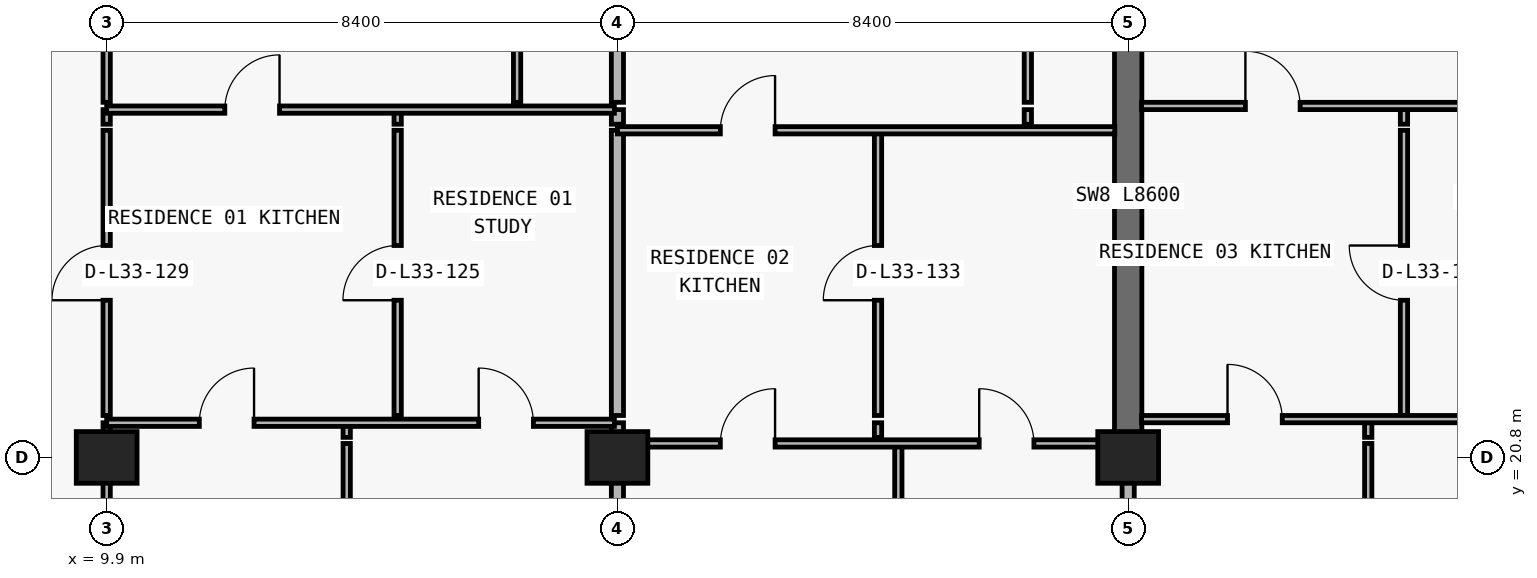
"""IFC4 building model, lengths in metres.
Left out: names, types, materials, properties, quantities, classifications, styles, units other than length and angle.
Written with IfcOpenShell. Run it as: python <this file> out.ifc"""

import sys

from ifc_helpers import new_model, si_unit, direction, frame, frame_2d, origin, origin_2d, place, context, subcontext, project, spatial, rectangle, extrude, element, fill, save


model = new_model("IFC4")
c1 = context("Model", 3, precision=1e-05, world=origin(), true_north=direction((0.0, 1.0)))
c2 = subcontext(c1, "Body", "Model", "MODEL_VIEW")
j1 = project(units=[si_unit("LENGTHUNIT", "METRE"), si_unit("PLANEANGLEUNIT", "RADIAN")], contexts=[c1])
p1 = place(None, origin())
s1 = spatial("IfcSite", under=j1, at=p1, CompositionType="ELEMENT")
p2 = place(p1, origin())
s2 = spatial("IfcBuilding", under=s1, at=p2, CompositionType="ELEMENT")
p3 = place(p2, frame((0.0, 0.0, 122.4)))
s3 = spatial("IfcBuildingStorey", under=s2, at=p3, CompositionType="ELEMENT", Elevation=122.4)
for number, where, z_axis, x_axis in (
    (1, (9.9, 20.8, 0.0), (0.0, 0.0, 1.0), (1.0, 0.0, 0.0)),
    (2, (18.3, 20.8, 0.0), (0.0, 0.0, 1.0), (1.0, 0.0, 0.0)),
    (3, (26.7, 20.8, 0.0), (0.0, 0.0, 1.0), (1.0, 0.0, 0.0)),
):
    element("IfcColumn", number, at=place(p3, frame(where, z_axis=z_axis, x_axis=x_axis)), inside=s3, PredefinedType="COLUMN", context=c2, shape_type="SweptSolid", body=[
        extrude(rectangle(XDim=1.0, YDim=0.85, at=origin_2d()), origin(), (0.0, 0.0, 1.0), 3.05),
    ])
p4 = place(p3, frame((26.7, 20.8, 0.0), z_axis=(0.0, 0.0, 1.0), x_axis=(0.0, 1.0, 0.0)))
e4 = element("IfcWall", 4, at=p4, inside=s3, PredefinedType="SHEAR", context=c2, shape_type="SweptSolid", body=[
    extrude(rectangle(XDim=8.6, YDim=0.45, at=frame_2d((4.3, 0.0))), origin(), (0.0, 0.0, 1.0), 3.05),
])
p5 = place(p3, frame((9.9, 8.84, 0.0), z_axis=(0.0, 0.0, 1.0), x_axis=(0.0, 1.0, 0.0)))
e5 = element("IfcWall", 5, at=p5, inside=s3, PredefinedType="PARTITIONING", context=c2, shape_type="SweptSolid", body=[
    extrude(rectangle(XDim=12.19, YDim=0.12, at=frame_2d((6.095, 0.0))), origin(), (0.0, 0.0, 1.0), 2.174),
])
p6 = place(p3, frame((9.9, 21.13, 0.0), z_axis=(0.0, 0.0, 1.0), x_axis=(0.0, 1.0, 0.0)))
e6 = element("IfcWall", 6, at=p6, inside=s3, PredefinedType="PARTITIONING", context=c2, shape_type="SweptSolid", body=[
    extrude(rectangle(XDim=0.24, YDim=0.12, at=frame_2d((0.12, 0.0))), origin(), (0.0, 0.0, 1.0), 2.174),
])
p7 = place(p3, frame((9.9, 21.49, 0.0), z_axis=(0.0, 0.0, 1.0), x_axis=(0.0, 1.0, 0.0)))
e7 = element("IfcWall", 7, at=p7, inside=s3, PredefinedType="PARTITIONING", context=c2, shape_type="SweptSolid", body=[
    extrude(rectangle(XDim=4.69, YDim=0.12, at=frame_2d((2.345, 0.0))), origin(), (0.0, 0.0, 1.0), 2.174),
])
p8 = place(p7, frame((1.895, 0.0, 0.0)))
e8 = element("IfcOpeningElement", 8, at=p8, cuts=e7, PredefinedType="OPENING", context=c2, shape_type="SweptSolid", body=[
    extrude(rectangle(XDim=0.9, YDim=2.124, at=frame_2d((0.45, 1.062))), frame((0.0, 0.07, 0.0), z_axis=(0.0, -1.0, 0.0), x_axis=(1.0, 0.0, 0.0)), (0.0, 0.0, 1.0), 0.14),
])
p9 = place(p3, frame((9.9, 26.28, 0.0), z_axis=(0.0, 0.0, 1.0), x_axis=(0.0, 1.0, 0.0)))
e9 = element("IfcWall", 9, at=p9, inside=s3, PredefinedType="PARTITIONING", context=c2, shape_type="SweptSolid", body=[
    extrude(rectangle(XDim=0.24, YDim=0.12, at=frame_2d((0.12, 0.0))), origin(), (0.0, 0.0, 1.0), 2.174),
])
p10 = place(p3, frame((9.9, 26.64, 0.0), z_axis=(0.0, 0.0, 1.0), x_axis=(0.0, 1.0, 0.0)))
e10 = element("IfcWall", 10, at=p10, inside=s3, PredefinedType="PARTITIONING", context=c2, shape_type="SweptSolid", body=[
    extrude(rectangle(XDim=8.06, YDim=0.12, at=frame_2d((4.03, 0.0))), origin(), (0.0, 0.0, 1.0), 2.174),
])
p11 = place(p3, frame((13.848, 8.84, 0.0), z_axis=(0.0, 0.0, 1.0), x_axis=(0.0, 1.0, 0.0)))
e11 = element("IfcWall", 11, at=p11, inside=s3, PredefinedType="PARTITIONING", context=c2, shape_type="SweptSolid", body=[
    extrude(rectangle(XDim=12.19, YDim=0.12, at=frame_2d((6.095, 0.0))), origin(), (0.0, 0.0, 1.0), 3.05),
])
p12 = place(p3, frame((13.848, 21.13, 0.0), z_axis=(0.0, 0.0, 1.0), x_axis=(0.0, 1.0, 0.0)))
e12 = element("IfcWall", 12, at=p12, inside=s3, PredefinedType="PARTITIONING", context=c2, shape_type="SweptSolid", body=[
    extrude(rectangle(XDim=0.24, YDim=0.12, at=frame_2d((0.12, 0.0))), origin(), (0.0, 0.0, 1.0), 3.05),
])
p13 = place(p3, frame((14.686, 21.49, 0.0), z_axis=(0.0, 0.0, 1.0), x_axis=(0.0, 1.0, 0.0)))
e13 = element("IfcWall", 13, at=p13, inside=s3, PredefinedType="PARTITIONING", context=c2, shape_type="SweptSolid", body=[
    extrude(rectangle(XDim=4.69, YDim=0.12, at=frame_2d((2.345, 0.0))), origin(), (0.0, 0.0, 1.0), 3.05),
])
p14 = place(p13, frame((1.895, 0.0, 0.0)))
e14 = element("IfcOpeningElement", 14, at=p14, cuts=e13, PredefinedType="OPENING", context=c2, shape_type="SweptSolid", body=[
    extrude(rectangle(XDim=0.9, YDim=2.15, at=frame_2d((0.45, 1.075))), frame((0.0, 0.07, 0.0), z_axis=(0.0, -1.0, 0.0), x_axis=(1.0, 0.0, 0.0)), (0.0, 0.0, 1.0), 0.14),
])
p15 = place(p3, frame((14.686, 26.28, 0.0), z_axis=(0.0, 0.0, 1.0), x_axis=(0.0, 1.0, 0.0)))
e15 = element("IfcWall", 15, at=p15, inside=s3, PredefinedType="PARTITIONING", context=c2, shape_type="SweptSolid", body=[
    extrude(rectangle(XDim=0.24, YDim=0.12, at=frame_2d((0.12, 0.0))), origin(), (0.0, 0.0, 1.0), 3.05),
])
p16 = place(p3, frame((16.65, 26.64, 0.0), z_axis=(0.0, 0.0, 1.0), x_axis=(0.0, 1.0, 0.0)))
e16 = element("IfcWall", 16, at=p16, inside=s3, PredefinedType="PARTITIONING", context=c2, shape_type="SweptSolid", body=[
    extrude(rectangle(XDim=8.06, YDim=0.12, at=frame_2d((4.03, 0.0))), origin(), (0.0, 0.0, 1.0), 3.05),
])
p17 = place(p16, frame((3.755, 0.0, 0.0)))
e17 = element("IfcOpeningElement", 17, at=p17, cuts=e16, PredefinedType="OPENING", context=c2, shape_type="SweptSolid", body=[
    extrude(rectangle(XDim=0.85, YDim=2.1, at=frame_2d((0.425, 1.05))), frame((0.0, 0.07, 0.0), z_axis=(0.0, -1.0, 0.0), x_axis=(1.0, 0.0, 0.0)), (0.0, 0.0, 1.0), 0.14),
])
p18 = place(p3, frame((18.3, 8.84, 0.0), z_axis=(0.0, 0.0, 1.0), x_axis=(0.0, 1.0, 0.0)))
e18 = element("IfcWall", 18, at=p18, inside=s3, PredefinedType="PARTITIONING", context=c2, shape_type="SweptSolid", body=[
    extrude(rectangle(XDim=12.19, YDim=0.2, at=frame_2d((6.095, 0.0))), origin(), (0.0, 0.0, 1.0), 2.174),
])
p19 = place(p3, frame((18.3, 21.13, 0.0), z_axis=(0.0, 0.0, 1.0), x_axis=(0.0, 1.0, 0.0)))
e19 = element("IfcWall", 19, at=p19, inside=s3, PredefinedType="PARTITIONING", context=c2, shape_type="SweptSolid", body=[
    extrude(rectangle(XDim=0.24, YDim=0.2, at=frame_2d((0.12, 0.0))), origin(), (0.0, 0.0, 1.0), 2.174),
])
p20 = place(p3, frame((18.3, 21.49, 0.0), z_axis=(0.0, 0.0, 1.0), x_axis=(0.0, 1.0, 0.0)))
e20 = element("IfcWall", 20, at=p20, inside=s3, PredefinedType="PARTITIONING", context=c2, shape_type="SweptSolid", body=[
    extrude(rectangle(XDim=4.69, YDim=0.2, at=frame_2d((2.345, 0.0))), origin(), (0.0, 0.0, 1.0), 2.174),
])
p21 = place(p3, frame((18.3, 26.28, 0.0), z_axis=(0.0, 0.0, 1.0), x_axis=(0.0, 1.0, 0.0)))
e21 = element("IfcWall", 21, at=p21, inside=s3, PredefinedType="PARTITIONING", context=c2, shape_type="SweptSolid", body=[
    extrude(rectangle(XDim=0.24, YDim=0.2, at=frame_2d((0.12, 0.0))), origin(), (0.0, 0.0, 1.0), 2.174),
])
p22 = place(p3, frame((18.3, 26.64, 0.0), z_axis=(0.0, 0.0, 1.0), x_axis=(0.0, 1.0, 0.0)))
e22 = element("IfcWall", 22, at=p22, inside=s3, PredefinedType="PARTITIONING", context=c2, shape_type="SweptSolid", body=[
    extrude(rectangle(XDim=8.06, YDim=0.2, at=frame_2d((4.03, 0.0))), origin(), (0.0, 0.0, 1.0), 2.174),
])
p23 = place(p3, frame((22.586, 21.13, 0.0), z_axis=(0.0, 0.0, 1.0), x_axis=(0.0, 1.0, 0.0)))
e23 = element("IfcWall", 23, at=p23, inside=s3, PredefinedType="PARTITIONING", context=c2, shape_type="SweptSolid", body=[
    extrude(rectangle(XDim=0.24, YDim=0.12, at=frame_2d((0.12, 0.0))), origin(), (0.0, 0.0, 1.0), 2.486),
])
p24 = place(p3, frame((22.586, 21.49, 0.0), z_axis=(0.0, 0.0, 1.0), x_axis=(0.0, 1.0, 0.0)))
e24 = element("IfcWall", 24, at=p24, inside=s3, PredefinedType="PARTITIONING", context=c2, shape_type="SweptSolid", body=[
    extrude(rectangle(XDim=4.69, YDim=0.12, at=frame_2d((2.345, 0.0))), origin(), (0.0, 0.0, 1.0), 2.486),
])
p25 = place(p24, frame((1.895, 0.0, 0.0)))
e25 = element("IfcOpeningElement", 25, at=p25, cuts=e24, PredefinedType="OPENING", context=c2, shape_type="SweptSolid", body=[
    extrude(rectangle(XDim=0.9, YDim=2.15, at=frame_2d((0.45, 1.075))), frame((0.0, 0.07, 0.0), z_axis=(0.0, -1.0, 0.0), x_axis=(1.0, 0.0, 0.0)), (0.0, 0.0, 1.0), 0.14),
])
p26 = place(p3, frame((22.92, 8.84, 0.0), z_axis=(0.0, 0.0, 1.0), x_axis=(0.0, 1.0, 0.0)))
e26 = element("IfcWall", 26, at=p26, inside=s3, PredefinedType="PARTITIONING", context=c2, shape_type="SweptSolid", body=[
    extrude(rectangle(XDim=12.19, YDim=0.12, at=frame_2d((6.095, 0.0))), origin(), (0.0, 0.0, 1.0), 3.05),
])
p27 = place(p3, frame((25.05, 26.28, 0.0), z_axis=(0.0, 0.0, 1.0), x_axis=(0.0, 1.0, 0.0)))
e27 = element("IfcWall", 27, at=p27, inside=s3, PredefinedType="PARTITIONING", context=c2, shape_type="SweptSolid", body=[
    extrude(rectangle(XDim=0.24, YDim=0.12, at=frame_2d((0.12, 0.0))), origin(), (0.0, 0.0, 1.0), 3.05),
])
p28 = place(p3, frame((25.05, 26.64, 0.0), z_axis=(0.0, 0.0, 1.0), x_axis=(0.0, 1.0, 0.0)))
e28 = element("IfcWall", 28, at=p28, inside=s3, PredefinedType="PARTITIONING", context=c2, shape_type="SweptSolid", body=[
    extrude(rectangle(XDim=8.06, YDim=0.12, at=frame_2d((4.03, 0.0))), origin(), (0.0, 0.0, 1.0), 3.05),
])
p29 = place(p28, frame((3.755, 0.0, 0.0)))
e29 = element("IfcOpeningElement", 29, at=p29, cuts=e28, PredefinedType="OPENING", context=c2, shape_type="SweptSolid", body=[
    extrude(rectangle(XDim=0.85, YDim=2.1, at=frame_2d((0.425, 1.05))), frame((0.0, 0.07, 0.0), z_axis=(0.0, -1.0, 0.0), x_axis=(1.0, 0.0, 0.0)), (0.0, 0.0, 1.0), 0.14),
])
p30 = place(p3, frame((26.7, 8.84, 0.0), z_axis=(0.0, 0.0, 1.0), x_axis=(0.0, 1.0, 0.0)))
e30 = element("IfcWall", 30, at=p30, inside=s3, PredefinedType="PARTITIONING", context=c2, shape_type="SweptSolid", body=[
    extrude(rectangle(XDim=11.955, YDim=0.2, at=frame_2d((5.978, 0.0))), origin(), (0.0, 0.0, 1.0), 2.174),
])
p31 = place(p3, frame((30.648, 8.84, 0.0), z_axis=(0.0, 0.0, 1.0), x_axis=(0.0, 1.0, 0.0)))
e31 = element("IfcWall", 31, at=p31, inside=s3, PredefinedType="PARTITIONING", context=c2, shape_type="SweptSolid", body=[
    extrude(rectangle(XDim=12.19, YDim=0.12, at=frame_2d((6.095, 0.0))), origin(), (0.0, 0.0, 1.0), 3.05),
])
p32 = place(p3, frame((30.648, 21.13, 0.0), z_axis=(0.0, 0.0, 1.0), x_axis=(0.0, 1.0, 0.0)))
e32 = element("IfcWall", 32, at=p32, inside=s3, PredefinedType="PARTITIONING", context=c2, shape_type="SweptSolid", body=[
    extrude(rectangle(XDim=0.24, YDim=0.12, at=frame_2d((0.12, 0.0))), origin(), (0.0, 0.0, 1.0), 3.05),
])
p33 = place(p3, frame((31.236, 21.49, 0.0), z_axis=(0.0, 0.0, 1.0), x_axis=(0.0, 1.0, 0.0)))
e33 = element("IfcWall", 33, at=p33, inside=s3, PredefinedType="PARTITIONING", context=c2, shape_type="SweptSolid", body=[
    extrude(rectangle(XDim=4.69, YDim=0.12, at=frame_2d((2.345, 0.0))), origin(), (0.0, 0.0, 1.0), 3.05),
])
p34 = place(p33, frame((1.895, 0.0, 0.0)))
e34 = element("IfcOpeningElement", 34, at=p34, cuts=e33, PredefinedType="OPENING", context=c2, shape_type="SweptSolid", body=[
    extrude(rectangle(XDim=0.9, YDim=2.15, at=frame_2d((0.45, 1.075))), frame((0.0, 0.07, 0.0), z_axis=(0.0, -1.0, 0.0), x_axis=(1.0, 0.0, 0.0)), (0.0, 0.0, 1.0), 0.14),
])
p35 = place(p3, frame((31.236, 26.28, 0.0), z_axis=(0.0, 0.0, 1.0), x_axis=(0.0, 1.0, 0.0)))
e35 = element("IfcWall", 35, at=p35, inside=s3, PredefinedType="PARTITIONING", context=c2, shape_type="SweptSolid", body=[
    extrude(rectangle(XDim=0.24, YDim=0.12, at=frame_2d((0.12, 0.0))), origin(), (0.0, 0.0, 1.0), 3.05),
])
p36 = place(p3, frame((18.3, 21.03, 0.0), z_axis=(0.0, 0.0, 1.0), x_axis=(1.0, 0.0, 0.0)))
e36 = element("IfcWall", 36, at=p36, inside=s3, PredefinedType="PARTITIONING", context=c2, shape_type="SweptSolid", body=[
    extrude(rectangle(XDim=8.18, YDim=0.12, at=frame_2d((4.09, 0.0))), origin(), (0.0, 0.0, 1.0), 2.174),
])
p37 = place(p36, frame((1.693, 0.0, 0.0)))
e37 = element("IfcOpeningElement", 37, at=p37, cuts=e36, PredefinedType="OPENING", context=c2, shape_type="SweptSolid", body=[
    extrude(rectangle(XDim=0.9, YDim=2.124, at=frame_2d((0.45, 1.062))), frame((0.0, 0.07, 0.0), z_axis=(0.0, -1.0, 0.0), x_axis=(1.0, 0.0, 0.0)), (0.0, 0.0, 1.0), 0.14),
])
p38 = place(p36, frame((5.95, 0.0, 0.0)))
e38 = element("IfcOpeningElement", 38, at=p38, cuts=e36, PredefinedType="OPENING", context=c2, shape_type="SweptSolid", body=[
    extrude(rectangle(XDim=0.9, YDim=2.124, at=frame_2d((0.45, 1.062))), frame((0.0, 0.07, 0.0), z_axis=(0.0, -1.0, 0.0), x_axis=(1.0, 0.0, 0.0)), (0.0, 0.0, 1.0), 0.14),
])
p39 = place(p3, frame((9.9, 21.37, 0.0), z_axis=(0.0, 0.0, 1.0), x_axis=(1.0, 0.0, 0.0)))
e39 = element("IfcWall", 39, at=p39, inside=s3, PredefinedType="PARTITIONING", context=c2, shape_type="SweptSolid", body=[
    extrude(rectangle(XDim=8.35, YDim=0.12, at=frame_2d((4.175, 0.0))), origin(), (0.0, 0.0, 1.0), 3.05),
])
p40 = place(p39, frame((1.524, 0.0, 0.0)))
e40 = element("IfcOpeningElement", 40, at=p40, cuts=e39, PredefinedType="OPENING", context=c2, shape_type="SweptSolid", body=[
    extrude(rectangle(XDim=0.9, YDim=2.15, at=frame_2d((0.45, 1.075))), frame((0.0, 0.07, 0.0), z_axis=(0.0, -1.0, 0.0), x_axis=(1.0, 0.0, 0.0)), (0.0, 0.0, 1.0), 0.14),
])
p41 = place(p39, frame((6.118, 0.0, 0.0)))
e41 = element("IfcOpeningElement", 41, at=p41, cuts=e39, PredefinedType="OPENING", context=c2, shape_type="SweptSolid", body=[
    extrude(rectangle(XDim=0.9, YDim=2.15, at=frame_2d((0.45, 1.075))), frame((0.0, 0.07, 0.0), z_axis=(0.0, -1.0, 0.0), x_axis=(1.0, 0.0, 0.0)), (0.0, 0.0, 1.0), 0.14),
])
p42 = place(p3, frame((26.92, 21.43, 0.0), z_axis=(0.0, 0.0, 1.0), x_axis=(1.0, 0.0, 0.0)))
e42 = element("IfcWall", 42, at=p42, inside=s3, PredefinedType="PARTITIONING", context=c2, shape_type="SweptSolid", body=[
    extrude(rectangle(XDim=8.18, YDim=0.12, at=frame_2d((4.09, 0.0))), origin(), (0.0, 0.0, 1.0), 3.05),
])
p43 = place(p42, frame((1.414, 0.0, 0.0)))
e43 = element("IfcOpeningElement", 43, at=p43, cuts=e42, PredefinedType="OPENING", context=c2, shape_type="SweptSolid", body=[
    extrude(rectangle(XDim=0.9, YDim=2.15, at=frame_2d((0.45, 1.075))), frame((0.0, 0.07, 0.0), z_axis=(0.0, -1.0, 0.0), x_axis=(1.0, 0.0, 0.0)), (0.0, 0.0, 1.0), 0.14),
])
p44 = place(p42, frame((5.798, 0.0, 0.0)))
e44 = element("IfcOpeningElement", 44, at=p44, cuts=e42, PredefinedType="OPENING", context=c2, shape_type="SweptSolid", body=[
    extrude(rectangle(XDim=0.9, YDim=2.15, at=frame_2d((0.45, 1.075))), frame((0.0, 0.07, 0.0), z_axis=(0.0, -1.0, 0.0), x_axis=(1.0, 0.0, 0.0)), (0.0, 0.0, 1.0), 0.14),
])
p45 = place(p3, frame((18.3, 26.18, 0.0), z_axis=(0.0, 0.0, 1.0), x_axis=(1.0, 0.0, 0.0)))
e45 = element("IfcWall", 45, at=p45, inside=s3, PredefinedType="PARTITIONING", context=c2, shape_type="SweptSolid", body=[
    extrude(rectangle(XDim=8.18, YDim=0.12, at=frame_2d((4.09, 0.0))), origin(), (0.0, 0.0, 1.0), 3.05),
])
p46 = place(p45, frame((1.693, 0.0, 0.0)))
e46 = element("IfcOpeningElement", 46, at=p46, cuts=e45, PredefinedType="OPENING", context=c2, shape_type="SweptSolid", body=[
    extrude(rectangle(XDim=0.9, YDim=2.15, at=frame_2d((0.45, 1.075))), frame((0.0, 0.07, 0.0), z_axis=(0.0, -1.0, 0.0), x_axis=(1.0, 0.0, 0.0)), (0.0, 0.0, 1.0), 0.14),
])
p47 = place(p3, frame((9.9, 26.52, 0.0), z_axis=(0.0, 0.0, 1.0), x_axis=(1.0, 0.0, 0.0)))
e47 = element("IfcWall", 47, at=p47, inside=s3, PredefinedType="PARTITIONING", context=c2, shape_type="SweptSolid", body=[
    extrude(rectangle(XDim=8.35, YDim=0.12, at=frame_2d((4.175, 0.0))), origin(), (0.0, 0.0, 1.0), 3.05),
])
p48 = place(p47, frame((1.943, 0.0, 0.0)))
e48 = element("IfcOpeningElement", 48, at=p48, cuts=e47, PredefinedType="OPENING", context=c2, shape_type="SweptSolid", body=[
    extrude(rectangle(XDim=0.9, YDim=2.15, at=frame_2d((0.45, 1.075))), frame((0.0, 0.07, 0.0), z_axis=(0.0, -1.0, 0.0), x_axis=(1.0, 0.0, 0.0)), (0.0, 0.0, 1.0), 0.14),
])
p49 = place(p3, frame((26.92, 26.58, 0.0), z_axis=(0.0, 0.0, 1.0), x_axis=(1.0, 0.0, 0.0)))
e49 = element("IfcWall", 49, at=p49, inside=s3, PredefinedType="PARTITIONING", context=c2, shape_type="SweptSolid", body=[
    extrude(rectangle(XDim=8.18, YDim=0.12, at=frame_2d((4.09, 0.0))), origin(), (0.0, 0.0, 1.0), 3.05),
])
p50 = place(p49, frame((1.708, 0.0, 0.0)))
e50 = element("IfcOpeningElement", 50, at=p50, cuts=e49, PredefinedType="OPENING", context=c2, shape_type="SweptSolid", body=[
    extrude(rectangle(XDim=0.9, YDim=2.15, at=frame_2d((0.45, 1.075))), frame((0.0, 0.07, 0.0), z_axis=(0.0, -1.0, 0.0), x_axis=(1.0, 0.0, 0.0)), (0.0, 0.0, 1.0), 0.14),
])
p51 = place(p48, origin())
e51 = element("IfcDoor", 51, at=p51, inside=s3, OperationType="SINGLE_SWING_RIGHT", PredefinedType="DOOR", context=c2, shape_type="SweptSolid", body=[
    extrude(rectangle(XDim=0.9, YDim=2.15, at=frame_2d((0.45, 1.075))), frame((0.0, 0.025, 0.0), z_axis=(0.0, -1.0, 0.0), x_axis=(1.0, 0.0, 0.0)), (0.0, 0.0, 1.0), 0.05),
])
fill(e48, e51)
p52 = place(p14, origin())
e52 = element("IfcDoor", 52, at=p52, inside=s3, OperationType="SINGLE_SWING_LEFT", PredefinedType="DOOR", context=c2, shape_type="SweptSolid", body=[
    extrude(rectangle(XDim=0.9, YDim=2.15, at=frame_2d((0.45, 1.075))), frame((0.0, 0.025, 0.0), z_axis=(0.0, -1.0, 0.0), x_axis=(1.0, 0.0, 0.0)), (0.0, 0.0, 1.0), 0.05),
])
fill(e14, e52)
p53 = place(p40, origin())
e53 = element("IfcDoor", 53, at=p53, inside=s3, OperationType="SINGLE_SWING_RIGHT", PredefinedType="DOOR", context=c2, shape_type="SweptSolid", body=[
    extrude(rectangle(XDim=0.9, YDim=2.15, at=frame_2d((0.45, 1.075))), frame((0.0, 0.025, 0.0), z_axis=(0.0, -1.0, 0.0), x_axis=(1.0, 0.0, 0.0)), (0.0, 0.0, 1.0), 0.05),
])
fill(e40, e53)
p54 = place(p41, origin())
e54 = element("IfcDoor", 54, at=p54, inside=s3, OperationType="SINGLE_SWING_LEFT", PredefinedType="DOOR", context=c2, shape_type="SweptSolid", body=[
    extrude(rectangle(XDim=0.9, YDim=2.15, at=frame_2d((0.45, 1.075))), frame((0.0, 0.025, 0.0), z_axis=(0.0, -1.0, 0.0), x_axis=(1.0, 0.0, 0.0)), (0.0, 0.0, 1.0), 0.05),
])
fill(e41, e54)
p55 = place(p8, origin())
e55 = element("IfcDoor", 55, at=p55, inside=s3, OperationType="SINGLE_SWING_LEFT", PredefinedType="DOOR", context=c2, shape_type="SweptSolid", body=[
    extrude(rectangle(XDim=0.9, YDim=2.124, at=frame_2d((0.45, 1.062))), frame((0.0, 0.025, 0.0), z_axis=(0.0, -1.0, 0.0), x_axis=(1.0, 0.0, 0.0)), (0.0, 0.0, 1.0), 0.05),
])
fill(e8, e55)
p56 = place(p46, origin())
e56 = element("IfcDoor", 56, at=p56, inside=s3, OperationType="SINGLE_SWING_RIGHT", PredefinedType="DOOR", context=c2, shape_type="SweptSolid", body=[
    extrude(rectangle(XDim=0.9, YDim=2.15, at=frame_2d((0.45, 1.075))), frame((0.0, 0.025, 0.0), z_axis=(0.0, -1.0, 0.0), x_axis=(1.0, 0.0, 0.0)), (0.0, 0.0, 1.0), 0.05),
])
fill(e46, e56)
p57 = place(p25, origin())
e57 = element("IfcDoor", 57, at=p57, inside=s3, OperationType="SINGLE_SWING_LEFT", PredefinedType="DOOR", context=c2, shape_type="SweptSolid", body=[
    extrude(rectangle(XDim=0.9, YDim=2.15, at=frame_2d((0.45, 1.075))), frame((0.0, 0.025, 0.0), z_axis=(0.0, -1.0, 0.0), x_axis=(1.0, 0.0, 0.0)), (0.0, 0.0, 1.0), 0.05),
])
fill(e25, e57)
p58 = place(p37, origin())
e58 = element("IfcDoor", 58, at=p58, inside=s3, OperationType="SINGLE_SWING_RIGHT", PredefinedType="DOOR", context=c2, shape_type="SweptSolid", body=[
    extrude(rectangle(XDim=0.9, YDim=2.124, at=frame_2d((0.45, 1.062))), frame((0.0, 0.025, 0.0), z_axis=(0.0, -1.0, 0.0), x_axis=(1.0, 0.0, 0.0)), (0.0, 0.0, 1.0), 0.05),
])
fill(e37, e58)
p59 = place(p38, origin())
e59 = element("IfcDoor", 59, at=p59, inside=s3, OperationType="SINGLE_SWING_LEFT", PredefinedType="DOOR", context=c2, shape_type="SweptSolid", body=[
    extrude(rectangle(XDim=0.9, YDim=2.124, at=frame_2d((0.45, 1.062))), frame((0.0, 0.025, 0.0), z_axis=(0.0, -1.0, 0.0), x_axis=(1.0, 0.0, 0.0)), (0.0, 0.0, 1.0), 0.05),
])
fill(e38, e59)
p60 = place(p50, origin())
e60 = element("IfcDoor", 60, at=p60, inside=s3, OperationType="SINGLE_SWING_LEFT", PredefinedType="DOOR", context=c2, shape_type="SweptSolid", body=[
    extrude(rectangle(XDim=0.9, YDim=2.15, at=frame_2d((0.45, 1.075))), frame((0.0, 0.025, 0.0), z_axis=(0.0, -1.0, 0.0), x_axis=(1.0, 0.0, 0.0)), (0.0, 0.0, 1.0), 0.05),
])
fill(e50, e60)
p61 = place(p34, origin())
e61 = element("IfcDoor", 61, at=p61, inside=s3, OperationType="SINGLE_SWING_RIGHT", PredefinedType="DOOR", context=c2, shape_type="SweptSolid", body=[
    extrude(rectangle(XDim=0.9, YDim=2.15, at=frame_2d((0.45, 1.075))), frame((0.0, 0.025, 0.0), z_axis=(0.0, -1.0, 0.0), x_axis=(1.0, 0.0, 0.0)), (0.0, 0.0, 1.0), 0.05),
])
fill(e34, e61)
p62 = place(p43, origin())
e62 = element("IfcDoor", 62, at=p62, inside=s3, OperationType="SINGLE_SWING_LEFT", PredefinedType="DOOR", context=c2, shape_type="SweptSolid", body=[
    extrude(rectangle(XDim=0.9, YDim=2.15, at=frame_2d((0.45, 1.075))), frame((0.0, 0.025, 0.0), z_axis=(0.0, -1.0, 0.0), x_axis=(1.0, 0.0, 0.0)), (0.0, 0.0, 1.0), 0.05),
])
fill(e43, e62)
save(model, sys.argv[1])
